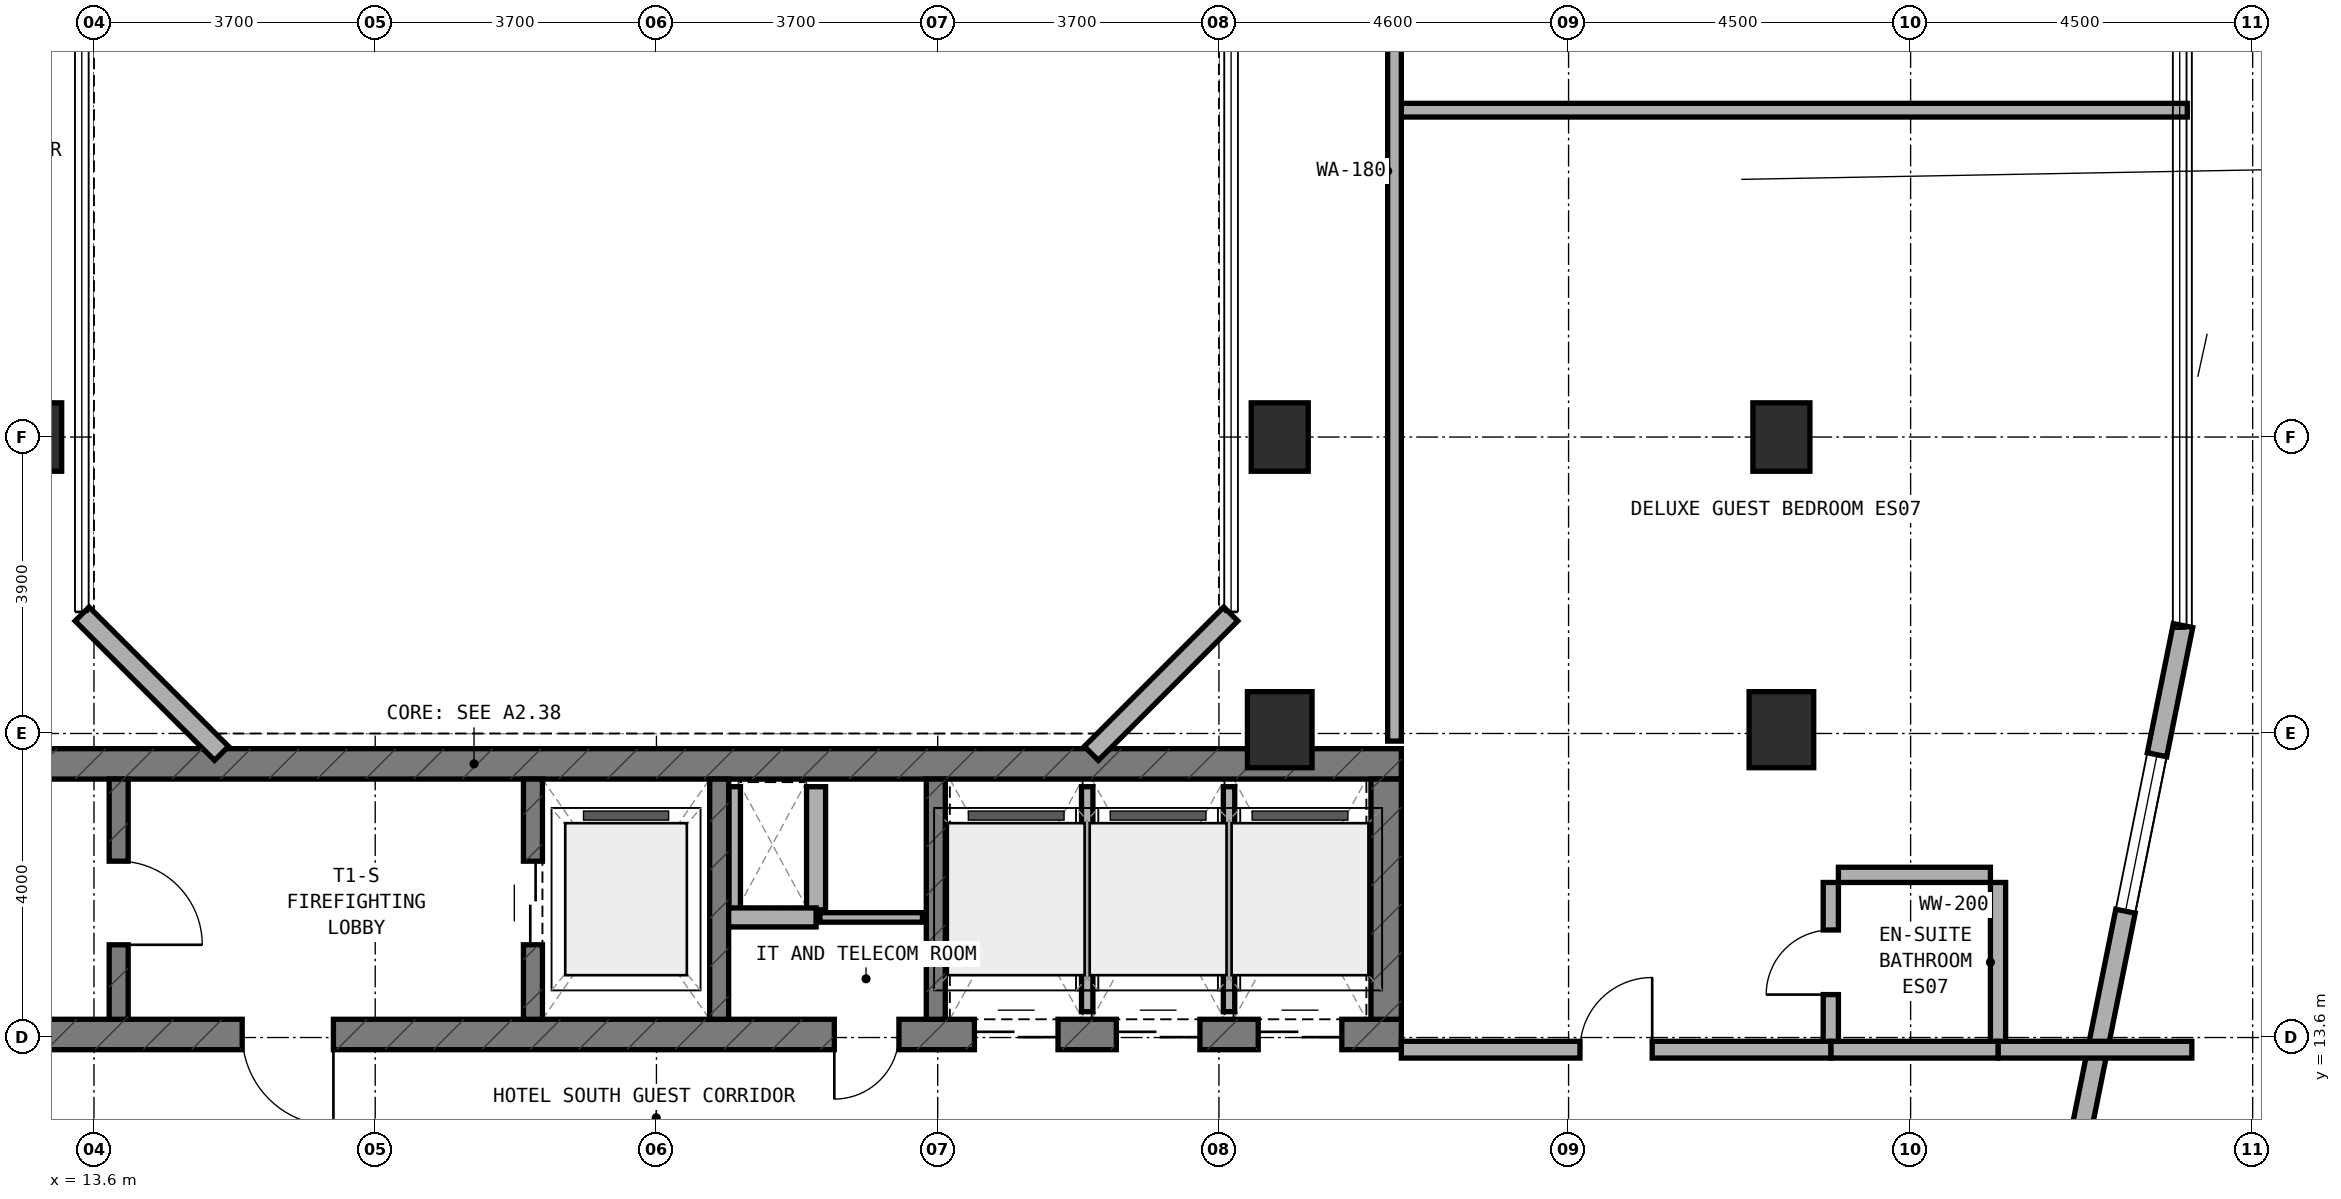
"""IFC4 building model, lengths in metres.
Left out: names, types, materials, properties, quantities, classifications, styles, units other than length and angle.
Written with IfcOpenShell. Run it as: python <this file> out.ifc"""

import sys

from ifc_helpers import new_model, si_unit, direction, frame, frame_2d, origin, origin_2d, place, context, subcontext, project, spatial, rectangle, extrude, element, fill, save


model = new_model("IFC4")
c1 = context("Model", 3, precision=1e-05, world=origin(), true_north=direction((0.0, 1.0)))
c2 = subcontext(c1, "Body", "Model", "MODEL_VIEW")
j1 = project(units=[si_unit("LENGTHUNIT", "METRE"), si_unit("PLANEANGLEUNIT", "RADIAN")], contexts=[c1])
p1 = place(None, origin())
s1 = spatial("IfcSite", under=j1, at=p1, CompositionType="ELEMENT")
p2 = place(p1, origin())
s2 = spatial("IfcBuilding", under=s1, at=p2, CompositionType="ELEMENT")
p3 = place(p2, frame((0.0, 0.0, 169.5)))
s3 = spatial("IfcBuildingStorey", under=s2, at=p3, CompositionType="ELEMENT", Elevation=169.5)
p4 = place(p3, frame((6.4, 13.64, 0.0), z_axis=(0.0, 0.0, 1.0), x_axis=(1.0, 0.0, 0.0)))
e1 = element("IfcWall", 1, at=p4, inside=s3, PredefinedType="SHEAR", context=c2, shape_type="SweptSolid", body=[
    extrude(rectangle(XDim=24.4, YDim=0.4, at=frame_2d((12.2, 0.0))), origin(), (0.0, 0.0, 1.0), 3.5),
])
p5 = place(p4, frame((9.15, 0.0, 0.0)))
e2 = element("IfcOpeningElement", 2, at=p5, cuts=e1, PredefinedType="OPENING", context=c2, shape_type="SweptSolid", body=[
    extrude(rectangle(XDim=1.2, YDim=2.15, at=frame_2d((0.6, 1.075))), frame((0.0, 0.21, 0.0), z_axis=(0.0, -1.0, 0.0), x_axis=(1.0, 0.0, 0.0)), (0.0, 0.0, 1.0), 0.42),
])
p6 = place(p4, frame((16.94, 0.0, 0.0)))
e3 = element("IfcOpeningElement", 3, at=p6, cuts=e1, PredefinedType="OPENING", context=c2, shape_type="SweptSolid", body=[
    extrude(rectangle(XDim=0.85, YDim=2.1, at=frame_2d((0.425, 1.05))), frame((0.0, 0.21, 0.0), z_axis=(0.0, -1.0, 0.0), x_axis=(1.0, 0.0, 0.0)), (0.0, 0.0, 1.0), 0.42),
])
p7 = place(p4, frame((18.783, 0.0, 0.0)))
e4 = element("IfcOpeningElement", 4, at=p7, cuts=e1, PredefinedType="OPENING", context=c2, shape_type="SweptSolid", body=[
    extrude(rectangle(XDim=1.1, YDim=2.15, at=frame_2d((0.55, 1.075))), frame((0.0, 0.21, 0.0), z_axis=(0.0, -1.0, 0.0), x_axis=(1.0, 0.0, 0.0)), (0.0, 0.0, 1.0), 0.42),
])
p8 = place(p4, frame((20.65, 0.0, 0.0)))
e5 = element("IfcOpeningElement", 5, at=p8, cuts=e1, PredefinedType="OPENING", context=c2, shape_type="SweptSolid", body=[
    extrude(rectangle(XDim=1.1, YDim=2.15, at=frame_2d((0.55, 1.075))), frame((0.0, 0.21, 0.0), z_axis=(0.0, -1.0, 0.0), x_axis=(1.0, 0.0, 0.0)), (0.0, 0.0, 1.0), 0.42),
])
p9 = place(p4, frame((22.517, 0.0, 0.0)))
e6 = element("IfcOpeningElement", 6, at=p9, cuts=e1, PredefinedType="OPENING", context=c2, shape_type="SweptSolid", body=[
    extrude(rectangle(XDim=1.1, YDim=2.15, at=frame_2d((0.55, 1.075))), frame((0.0, 0.21, 0.0), z_axis=(0.0, -1.0, 0.0), x_axis=(1.0, 0.0, 0.0)), (0.0, 0.0, 1.0), 0.42),
])
p10 = place(p3, frame((6.4, 17.2, 0.0), z_axis=(0.0, 0.0, 1.0), x_axis=(1.0, 0.0, 0.0)))
e7 = element("IfcWall", 7, at=p10, inside=s3, PredefinedType="SHEAR", context=c2, shape_type="SweptSolid", body=[
    extrude(rectangle(XDim=24.4, YDim=0.4, at=frame_2d((12.2, 0.0))), origin(), (0.0, 0.0, 1.0), 3.5),
])
p11 = place(p3, frame((30.6, 13.84, 0.0), z_axis=(0.0, 0.0, 1.0), x_axis=(0.0, 1.0, 0.0)))
e8 = element("IfcWall", 8, at=p11, inside=s3, PredefinedType="SHEAR", context=c2, shape_type="SweptSolid", body=[
    extrude(rectangle(XDim=3.16, YDim=0.4, at=frame_2d((1.58, 0.0))), origin(), (0.0, 0.0, 1.0), 3.5),
])
p12 = place(p3, frame((13.925, 13.84, 0.0), z_axis=(0.0, 0.0, 1.0), x_axis=(0.0, 1.0, 0.0)))
e9 = element("IfcWall", 9, at=p12, inside=s3, PredefinedType="STANDARD", context=c2, shape_type="SweptSolid", body=[
    extrude(rectangle(XDim=3.16, YDim=0.25, at=frame_2d((1.58, 0.0))), origin(), (0.0, 0.0, 1.0), 3.18),
])
p13 = place(p12, frame((0.98, 0.0, 0.0)))
e10 = element("IfcOpeningElement", 10, at=p13, cuts=e9, PredefinedType="OPENING", context=c2, shape_type="SweptSolid", body=[
    extrude(rectangle(XDim=1.1, YDim=2.15, at=frame_2d((0.55, 1.075))), frame((0.0, 0.135, 0.0), z_axis=(0.0, -1.0, 0.0), x_axis=(1.0, 0.0, 0.0)), (0.0, 0.0, 1.0), 0.27),
])
p14 = place(p3, frame((19.375, 13.84, 0.0), z_axis=(0.0, 0.0, 1.0), x_axis=(0.0, 1.0, 0.0)))
e11 = element("IfcWall", 11, at=p14, inside=s3, PredefinedType="STANDARD", context=c2, shape_type="SweptSolid", body=[
    extrude(rectangle(XDim=3.16, YDim=0.25, at=frame_2d((1.58, 0.0))), origin(), (0.0, 0.0, 1.0), 3.18),
])
p15 = place(p14, frame((0.98, 0.0, 0.0)))
e12 = element("IfcOpeningElement", 12, at=p15, cuts=e11, PredefinedType="OPENING", context=c2, shape_type="SweptSolid", body=[
    extrude(rectangle(XDim=1.1, YDim=2.15, at=frame_2d((0.55, 1.075))), frame((0.0, 0.135, 0.0), z_axis=(0.0, -1.0, 0.0), x_axis=(1.0, 0.0, 0.0)), (0.0, 0.0, 1.0), 0.27),
])
for number, where, z_axis, x_axis in (
    (13, (21.825, 13.84, 0.0), (0.0, 0.0, 1.0), (0.0, 1.0, 0.0)),
    (14, (24.675, 13.84, 0.0), (0.0, 0.0, 1.0), (0.0, 1.0, 0.0)),
):
    element("IfcWall", number, at=place(p3, frame(where, z_axis=z_axis, x_axis=x_axis)), inside=s3, PredefinedType="STANDARD", context=c2, shape_type="SweptSolid", body=[
        extrude(rectangle(XDim=3.16, YDim=0.25, at=frame_2d((1.58, 0.0))), origin(), (0.0, 0.0, 1.0), 3.18),
    ])
p16 = place(p3, frame((35.8, 21.5, 0.0), z_axis=(0.0, 0.0, 1.0), x_axis=(1.0, 0.0, 0.0)))
e15 = element("IfcColumn", 15, at=p16, inside=s3, PredefinedType="COLUMN", context=c2, shape_type="SweptSolid", body=[
    extrude(rectangle(XDim=0.75, YDim=0.9, at=origin_2d()), origin(), (0.0, 0.0, 1.0), 3.5),
])
p17 = place(p3, frame((35.8, 17.65, 0.0), z_axis=(0.0, 0.0, 1.0), x_axis=(1.0, 0.0, 0.0)))
e16 = element("IfcColumn", 16, at=p17, inside=s3, PredefinedType="COLUMN", context=c2, shape_type="SweptSolid", body=[
    extrude(rectangle(XDim=0.85, YDim=1.0, at=origin_2d()), origin(), (0.0, 0.0, 1.0), 3.5),
])
p18 = place(p3, frame((12.8, 21.5, 0.0), z_axis=(0.0, 0.0, 1.0), x_axis=(1.0, 0.0, 0.0)))
e17 = element("IfcColumn", 17, at=p18, inside=s3, PredefinedType="COLUMN", context=c2, shape_type="SweptSolid", body=[
    extrude(rectangle(XDim=0.75, YDim=0.9, at=origin_2d()), origin(), (0.0, 0.0, 1.0), 3.5),
])
p19 = place(p3, frame((29.2, 17.65, 0.0), z_axis=(0.0, 0.0, 1.0), x_axis=(1.0, 0.0, 0.0)))
e18 = element("IfcColumn", 18, at=p19, inside=s3, PredefinedType="COLUMN", context=c2, shape_type="SweptSolid", body=[
    extrude(rectangle(XDim=0.85, YDim=1.0, at=origin_2d()), origin(), (0.0, 0.0, 1.0), 3.5),
])
p20 = place(p3, frame((29.2, 21.5, 0.0), z_axis=(0.0, 0.0, 1.0), x_axis=(1.0, 0.0, 0.0)))
e19 = element("IfcColumn", 19, at=p20, inside=s3, PredefinedType="COLUMN", context=c2, shape_type="SweptSolid", body=[
    extrude(rectangle(XDim=0.75, YDim=0.9, at=origin_2d()), origin(), (0.0, 0.0, 1.0), 3.5),
])
p21 = place(p3, frame((39.271, 10.018, 0.0), z_axis=(0.0, 0.0, 1.0), x_axis=(0.197435082048, 0.980315963543, 0.0)))
e20 = element("IfcWall", 20, at=p21, inside=s3, PredefinedType="STANDARD", context=c2, shape_type="SweptSolid", body=[
    extrude(rectangle(XDim=9.183, YDim=0.26, at=frame_2d((4.591, 0.0))), origin(), (0.0, 0.0, 1.0), 3.18),
])
p22 = place(p21, frame((5.349, 0.0, 0.85)))
e21 = element("IfcOpeningElement", 21, at=p22, cuts=e20, PredefinedType="OPENING", context=c2, shape_type="SweptSolid", body=[
    extrude(rectangle(XDim=2.1, YDim=1.5, at=frame_2d((1.05, 0.75))), frame((0.0, 0.14, 0.0), z_axis=(0.0, -1.0, 0.0), x_axis=(1.0, 0.0, 0.0)), (0.0, 0.0, 1.0), 0.28),
])
for number, where, z_axis, x_axis in (
    (22, (26.722, 17.338, 0.0), (0.0, 0.0, 1.0), (0.707, 0.707, 0.0)),
    (23, (13.444, 19.172, 0.0), (0.0, 0.0, 1.0), (0.707, -0.707, 0.0)),
):
    element("IfcWall", number, at=place(p3, frame(where, z_axis=z_axis, x_axis=x_axis)), inside=s3, PredefinedType="STANDARD", context=c2, shape_type="SweptSolid", body=[
        extrude(rectangle(XDim=2.594, YDim=0.26, at=frame_2d((1.297, 0.0))), origin(), (0.0, 0.0, 1.0), 3.18),
    ])
p23 = place(p3, frame((22.03, 15.28, 0.0), z_axis=(0.0, 0.0, 1.0), x_axis=(0.0, 1.0, 0.0)))
e24 = element("IfcWall", 24, at=p23, inside=s3, PredefinedType="PARTITIONING", context=c2, shape_type="SweptSolid", body=[
    extrude(rectangle(XDim=1.62, YDim=0.15, at=frame_2d((0.81, 0.0))), origin(), (0.0, 0.0, 1.0), 3.18),
])
p24 = place(p3, frame((23.1, 15.28, 0.0), z_axis=(0.0, 0.0, 1.0), x_axis=(0.0, 1.0, 0.0)))
e25 = element("IfcWall", 25, at=p24, inside=s3, PredefinedType="SOLIDWALL", context=c2, shape_type="SweptSolid", body=[
    extrude(rectangle(XDim=1.62, YDim=0.25, at=frame_2d((0.81, 0.0))), origin(), (0.0, 0.0, 1.0), 3.18),
])
p25 = place(p3, frame((21.95, 15.18, 0.0), z_axis=(0.0, 0.0, 1.0), x_axis=(1.0, 0.0, 0.0)))
e26 = element("IfcWall", 26, at=p25, inside=s3, PredefinedType="SOLIDWALL", context=c2, shape_type="SweptSolid", body=[
    extrude(rectangle(XDim=1.15, YDim=0.25, at=frame_2d((0.575, 0.0))), origin(), (0.0, 0.0, 1.0), 3.18),
])
p26 = place(p3, frame((23.15, 15.18, 0.0), z_axis=(0.0, 0.0, 1.0), x_axis=(1.0, 0.0, 0.0)))
e27 = element("IfcWall", 27, at=p26, inside=s3, PredefinedType="PARTITIONING", context=c2, shape_type="SweptSolid", body=[
    extrude(rectangle(XDim=1.35, YDim=0.125, at=frame_2d((0.675, 0.0))), origin(), (0.0, 0.0, 1.0), 3.18),
])
p27 = place(p3, frame((26.667, 13.94, 0.0), z_axis=(0.0, 0.0, 1.0), x_axis=(0.0, 1.0, 0.0)))
e28 = element("IfcWall", 28, at=p27, inside=s3, PredefinedType="PARTITIONING", context=c2, shape_type="SweptSolid", body=[
    extrude(rectangle(XDim=2.96, YDim=0.15, at=frame_2d((1.48, 0.0))), origin(), (0.0, 0.0, 1.0), 3.18),
])
p28 = place(p3, frame((28.533, 13.94, 0.0), z_axis=(0.0, 0.0, 1.0), x_axis=(0.0, 1.0, 0.0)))
e29 = element("IfcWall", 29, at=p28, inside=s3, PredefinedType="PARTITIONING", context=c2, shape_type="SweptSolid", body=[
    extrude(rectangle(XDim=2.96, YDim=0.15, at=frame_2d((1.48, 0.0))), origin(), (0.0, 0.0, 1.0), 2.855),
])
p29 = place(p3, frame((30.8, 25.8, 0.0), z_axis=(0.0, 0.0, 1.0), x_axis=(1.0, 0.0, 0.0)))
e30 = element("IfcWall", 30, at=p29, inside=s3, PredefinedType="SOLIDWALL", context=c2, shape_type="SweptSolid", body=[
    extrude(rectangle(XDim=10.34, YDim=0.18, at=frame_2d((5.17, 0.0))), origin(), (0.0, 0.0, 1.0), 2.795),
])
p30 = place(p3, frame((30.71, 17.5, 0.0), z_axis=(0.0, 0.0, 1.0), x_axis=(0.0, 1.0, 0.0)))
e31 = element("IfcWall", 31, at=p30, inside=s3, PredefinedType="SOLIDWALL", context=c2, shape_type="SweptSolid", body=[
    extrude(rectangle(XDim=15.0, YDim=0.18, at=frame_2d((7.5, 0.0))), origin(), (0.0, 0.0, 1.0), 2.855),
])
p31 = place(p3, frame((36.45, 13.54, 0.0), z_axis=(0.0, 0.0, 1.0), x_axis=(0.0, 1.0, 0.0)))
e32 = element("IfcWall", 32, at=p31, inside=s3, PredefinedType="PLUMBINGWALL", context=c2, shape_type="SweptSolid", body=[
    extrude(rectangle(XDim=2.1, YDim=0.2, at=frame_2d((1.05, 0.0))), origin(), (0.0, 0.0, 1.0), 3.18),
])
p32 = place(p31, frame((0.625, 0.0, 0.0)))
e33 = element("IfcOpeningElement", 33, at=p32, cuts=e32, PredefinedType="OPENING", context=c2, shape_type="SweptSolid", body=[
    extrude(rectangle(XDim=0.85, YDim=2.1, at=frame_2d((0.425, 1.05))), frame((0.0, 0.11, 0.0), z_axis=(0.0, -1.0, 0.0), x_axis=(1.0, 0.0, 0.0)), (0.0, 0.0, 1.0), 0.22),
])
p33 = place(p3, frame((36.55, 15.74, 0.0), z_axis=(0.0, 0.0, 1.0), x_axis=(1.0, 0.0, 0.0)))
e34 = element("IfcWall", 34, at=p33, inside=s3, PredefinedType="PLUMBINGWALL", context=c2, shape_type="SweptSolid", body=[
    extrude(rectangle(XDim=2.0, YDim=0.2, at=frame_2d((1.0, 0.0))), origin(), (0.0, 0.0, 1.0), 3.18),
])
p34 = place(p3, frame((38.65, 13.54, 0.0), z_axis=(0.0, 0.0, 1.0), x_axis=(0.0, 1.0, 0.0)))
e35 = element("IfcWall", 35, at=p34, inside=s3, PredefinedType="PLUMBINGWALL", context=c2, shape_type="SweptSolid", body=[
    extrude(rectangle(XDim=2.1, YDim=0.2, at=frame_2d((1.05, 0.0))), origin(), (0.0, 0.0, 1.0), 3.18),
])
p35 = place(p3, frame((38.65, 13.44, 0.0), z_axis=(0.0, 0.0, 1.0), x_axis=(1.0, 0.0, 0.0)))
e36 = element("IfcWall", 36, at=p35, inside=s3, PredefinedType="SOLIDWALL", context=c2, shape_type="SweptSolid", body=[
    extrude(rectangle(XDim=2.55, YDim=0.22, at=frame_2d((1.275, 0.0))), origin(), (0.0, 0.0, 1.0), 3.18),
])
p36 = place(p3, frame((36.45, 13.44, 0.0), z_axis=(0.0, 0.0, 1.0), x_axis=(1.0, 0.0, 0.0)))
e37 = element("IfcWall", 37, at=p36, inside=s3, PredefinedType="SOLIDWALL", context=c2, shape_type="SweptSolid", body=[
    extrude(rectangle(XDim=2.2, YDim=0.22, at=frame_2d((1.1, 0.0))), origin(), (0.0, 0.0, 1.0), 3.18),
])
p37 = place(p3, frame((30.8, 13.44, 0.0), z_axis=(0.0, 0.0, 1.0), x_axis=(1.0, 0.0, 0.0)))
e38 = element("IfcWall", 38, at=p37, inside=s3, PredefinedType="SOLIDWALL", context=c2, shape_type="SweptSolid", body=[
    extrude(rectangle(XDim=5.65, YDim=0.22, at=frame_2d((2.825, 0.0))), origin(), (0.0, 0.0, 1.0), 2.795),
])
p38 = place(p37, frame((2.35, 0.0, 0.0)))
e39 = element("IfcOpeningElement", 39, at=p38, cuts=e38, PredefinedType="OPENING", context=c2, shape_type="SweptSolid", body=[
    extrude(rectangle(XDim=0.95, YDim=2.1, at=frame_2d((0.475, 1.05))), frame((0.0, 0.12, 0.0), z_axis=(0.0, -1.0, 0.0), x_axis=(1.0, 0.0, 0.0)), (0.0, 0.0, 1.0), 0.24),
])
p39 = place(p22, origin())
e40 = element("IfcWindow", 40, at=p39, inside=s3, PartitioningType="SINGLE_PANEL", PredefinedType="WINDOW", context=c2, shape_type="SweptSolid", body=[
    extrude(rectangle(XDim=2.1, YDim=1.5, at=frame_2d((1.05, 0.75))), frame((0.0, 0.03, 0.0), z_axis=(0.0, -1.0, 0.0), x_axis=(1.0, 0.0, 0.0)), (0.0, 0.0, 1.0), 0.06),
])
fill(e21, e40)
p40 = place(p13, frame((1.1, 0.0, 0.0), z_axis=(0.0, 0.0, 1.0), x_axis=(-1.0, 0.0, 0.0)))
e41 = element("IfcDoor", 41, at=p40, inside=s3, OperationType="SINGLE_SWING_RIGHT", PredefinedType="DOOR", context=c2, shape_type="SweptSolid", body=[
    extrude(rectangle(XDim=1.1, YDim=2.15, at=frame_2d((0.55, 1.075))), frame((0.0, 0.025, 0.0), z_axis=(0.0, -1.0, 0.0), x_axis=(1.0, 0.0, 0.0)), (0.0, 0.0, 1.0), 0.05),
])
fill(e10, e41)
p41 = place(p5, frame((1.2, 0.0, 0.0), z_axis=(0.0, 0.0, 1.0), x_axis=(-1.0, 0.0, 0.0)))
e42 = element("IfcDoor", 42, at=p41, inside=s3, OperationType="SINGLE_SWING_LEFT", PredefinedType="DOOR", context=c2, shape_type="SweptSolid", body=[
    extrude(rectangle(XDim=1.2, YDim=2.15, at=frame_2d((0.6, 1.075))), frame((0.0, 0.025, 0.0), z_axis=(0.0, -1.0, 0.0), x_axis=(1.0, 0.0, 0.0)), (0.0, 0.0, 1.0), 0.05),
])
fill(e2, e42)
p42 = place(p15, origin())
e43 = element("IfcDoor", 43, at=p42, inside=s3, OperationType="DOUBLE_DOOR_SLIDING", PredefinedType="DOOR", context=c2, shape_type="SweptSolid", body=[
    extrude(rectangle(XDim=1.1, YDim=2.15, at=frame_2d((0.55, 1.075))), frame((0.0, 0.025, 0.0), z_axis=(0.0, -1.0, 0.0), x_axis=(1.0, 0.0, 0.0)), (0.0, 0.0, 1.0), 0.05),
])
fill(e12, e43)
p43 = place(p6, frame((0.85, 0.0, 0.0), z_axis=(0.0, 0.0, 1.0), x_axis=(-1.0, 0.0, 0.0)))
e44 = element("IfcDoor", 44, at=p43, inside=s3, OperationType="SINGLE_SWING_RIGHT", PredefinedType="DOOR", context=c2, shape_type="SweptSolid", body=[
    extrude(rectangle(XDim=0.85, YDim=2.1, at=frame_2d((0.425, 1.05))), frame((0.0, 0.025, 0.0), z_axis=(0.0, -1.0, 0.0), x_axis=(1.0, 0.0, 0.0)), (0.0, 0.0, 1.0), 0.05),
])
fill(e3, e44)
p44 = place(p7, frame((1.1, 0.0, 0.0), z_axis=(0.0, 0.0, 1.0), x_axis=(-1.0, 0.0, 0.0)))
e45 = element("IfcDoor", 45, at=p44, inside=s3, OperationType="DOUBLE_DOOR_SLIDING", PredefinedType="DOOR", context=c2, shape_type="SweptSolid", body=[
    extrude(rectangle(XDim=1.1, YDim=2.15, at=frame_2d((0.55, 1.075))), frame((0.0, 0.025, 0.0), z_axis=(0.0, -1.0, 0.0), x_axis=(1.0, 0.0, 0.0)), (0.0, 0.0, 1.0), 0.05),
])
fill(e4, e45)
p45 = place(p8, frame((1.1, 0.0, 0.0), z_axis=(0.0, 0.0, 1.0), x_axis=(-1.0, 0.0, 0.0)))
e46 = element("IfcDoor", 46, at=p45, inside=s3, OperationType="DOUBLE_DOOR_SLIDING", PredefinedType="DOOR", context=c2, shape_type="SweptSolid", body=[
    extrude(rectangle(XDim=1.1, YDim=2.15, at=frame_2d((0.55, 1.075))), frame((0.0, 0.025, 0.0), z_axis=(0.0, -1.0, 0.0), x_axis=(1.0, 0.0, 0.0)), (0.0, 0.0, 1.0), 0.05),
])
fill(e5, e46)
p46 = place(p9, frame((1.1, 0.0, 0.0), z_axis=(0.0, 0.0, 1.0), x_axis=(-1.0, 0.0, 0.0)))
e47 = element("IfcDoor", 47, at=p46, inside=s3, OperationType="DOUBLE_DOOR_SLIDING", PredefinedType="DOOR", context=c2, shape_type="SweptSolid", body=[
    extrude(rectangle(XDim=1.1, YDim=2.15, at=frame_2d((0.55, 1.075))), frame((0.0, 0.025, 0.0), z_axis=(0.0, -1.0, 0.0), x_axis=(1.0, 0.0, 0.0)), (0.0, 0.0, 1.0), 0.05),
])
fill(e6, e47)
p47 = place(p32, origin())
e48 = element("IfcDoor", 48, at=p47, inside=s3, OperationType="SINGLE_SWING_LEFT", PredefinedType="DOOR", context=c2, shape_type="SweptSolid", body=[
    extrude(rectangle(XDim=0.85, YDim=2.1, at=frame_2d((0.425, 1.05))), frame((0.0, 0.025, 0.0), z_axis=(0.0, -1.0, 0.0), x_axis=(1.0, 0.0, 0.0)), (0.0, 0.0, 1.0), 0.05),
])
fill(e33, e48)
p48 = place(p38, origin())
e49 = element("IfcDoor", 49, at=p48, inside=s3, OperationType="SINGLE_SWING_RIGHT", PredefinedType="DOOR", context=c2, shape_type="SweptSolid", body=[
    extrude(rectangle(XDim=0.95, YDim=2.1, at=frame_2d((0.475, 1.05))), frame((0.0, 0.025, 0.0), z_axis=(0.0, -1.0, 0.0), x_axis=(1.0, 0.0, 0.0)), (0.0, 0.0, 1.0), 0.05),
])
fill(e39, e49)
save(model, sys.argv[1])
